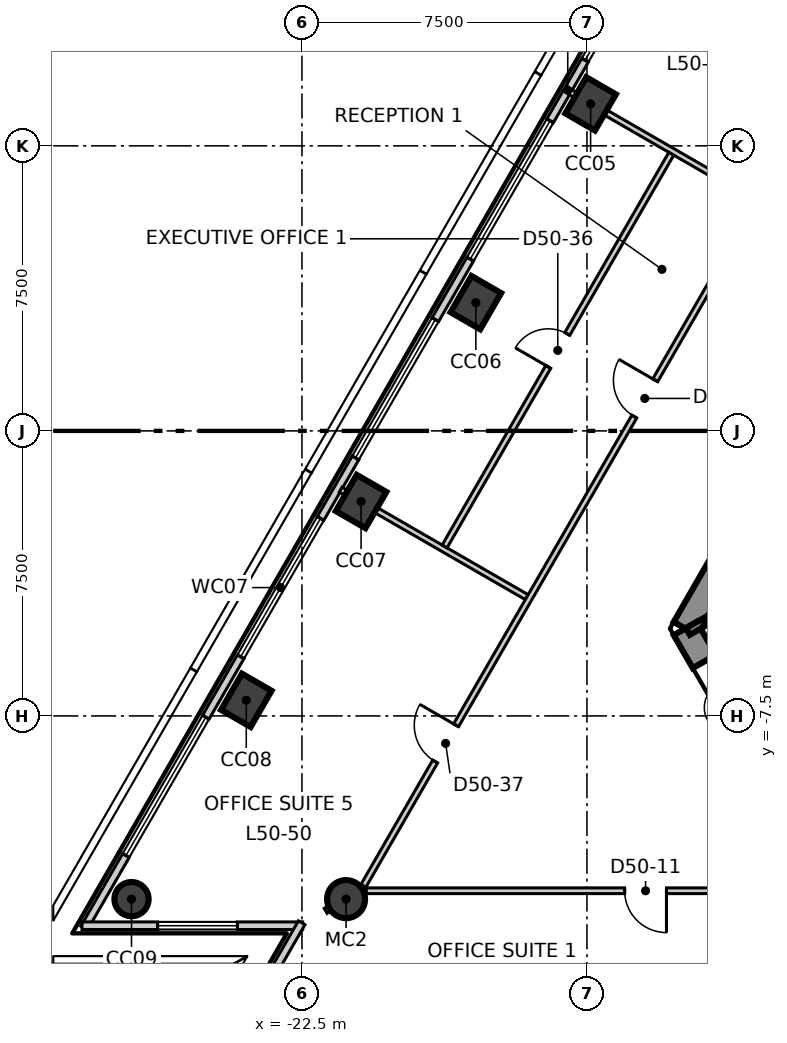
"""IFC4 building model, lengths in metres.
Left out: names, types, materials, properties, quantities, classifications, styles, units other than length and angle.
Written with IfcOpenShell. Run it as: python <this file> out.ifc"""

import sys

from ifc_helpers import new_model, si_unit, direction, frame, frame_2d, origin, origin_2d, place, context, subcontext, project, spatial, polyline, rectangle, circle, outline, extrude, element, fill, save


model = new_model("IFC4")
c1 = context("Model", 3, precision=1e-05, world=origin(), true_north=direction((0.0, 1.0)))
c2 = subcontext(c1, "Body", "Model", "MODEL_VIEW")
j1 = project(units=[si_unit("LENGTHUNIT", "METRE"), si_unit("PLANEANGLEUNIT", "RADIAN")], contexts=[c1])
p1 = place(None, origin())
s1 = spatial("IfcSite", under=j1, at=p1, CompositionType="ELEMENT")
p2 = place(p1, origin())
s2 = spatial("IfcBuilding", under=s1, at=p2, CompositionType="ELEMENT")
p3 = place(p2, frame((0.0, 0.0, 215.3)))
s3 = spatial("IfcBuildingStorey", under=s2, at=p3, CompositionType="ELEMENT", Elevation=215.3)
p4 = place(p3, frame((-1.703, 13.35, -0.3), z_axis=(0.0, 0.0, 1.0), x_axis=(-0.500011533395, -0.866018744874, 0.0)))
e1 = element("IfcWall", 1, at=p4, inside=s3, PredefinedType="SHEAR", context=c2, shape_type="SweptSolid", body=[
    extrude(outline(polyline([(-0.202, -0.35), (1.782, -0.35), (3.766, -0.35), (5.75, -0.35), (7.734, -0.35), (9.718, -0.35), (11.702, -0.35), (13.686, -0.35), (15.67, -0.35), (17.654, -0.35), (19.638, -0.35), (21.622, -0.35), (21.218, 0.35), (19.307, 0.35), (17.397, 0.35), (15.486, 0.35), (13.576, 0.35), (11.665, 0.35), (9.755, 0.35), (7.844, 0.35), (5.934, 0.35), (4.023, 0.35), (2.113, 0.35), (0.202, 0.35), (-0.202, -0.35)])), origin(), (0.0, 0.0, 1.0), 4.0),
])
p5 = place(p4, frame((10.16, 0.0, 0.3)))
e2 = element("IfcOpeningElement", 2, at=p5, cuts=e1, PredefinedType="OPENING", context=c2, shape_type="SweptSolid", body=[
    extrude(rectangle(XDim=1.1, YDim=2.1, at=frame_2d((0.55, 1.05))), frame((0.0, 0.36, 0.0), z_axis=(0.0, -1.0, 0.0), x_axis=(1.0, 0.0, 0.0)), (0.0, 0.0, 1.0), 0.72),
])
p6 = place(p4, frame((16.465, 0.0, 0.3)))
e3 = element("IfcOpeningElement", 3, at=p6, cuts=e1, PredefinedType="OPENING", context=c2, shape_type="SweptSolid", body=[
    extrude(rectangle(XDim=0.9, YDim=2.1, at=frame_2d((0.45, 1.05))), frame((0.0, 0.36, 0.0), z_axis=(0.0, -1.0, 0.0), x_axis=(1.0, 0.0, 0.0)), (0.0, 0.0, 1.0), 0.72),
])
p7 = place(p4, frame((4.005, 0.0, 0.3)))
e4 = element("IfcOpeningElement", 4, at=p7, cuts=e1, PredefinedType="OPENING", context=c2, shape_type="SweptSolid", body=[
    extrude(rectangle(XDim=1.0, YDim=2.1, at=frame_2d((0.5, 1.05))), frame((0.0, 0.36, 0.0), z_axis=(0.0, -1.0, 0.0), x_axis=(1.0, 0.0, 0.0)), (0.0, 0.0, 1.0), 0.72),
])
p8 = place(p3, frame((-12.413, -5.2, -0.3), z_axis=(0.0, 0.0, 1.0), x_axis=(0.49999337185, -0.866029230515, 0.0)))
e5 = element("IfcWall", 5, at=p8, inside=s3, PredefinedType="SHEAR", context=c2, shape_type="SweptSolid", body=[
    extrude(outline(polyline([(-0.202, -0.35), (1.703, -0.35), (3.608, -0.35), (3.204, 0.35), (1.703, 0.35), (0.202, 0.35), (-0.202, -0.35)])), origin(), (0.0, 0.0, 1.0), 4.0),
])
p9 = place(p8, frame((1.003, 0.0, 0.3)))
e6 = element("IfcOpeningElement", 6, at=p9, cuts=e5, PredefinedType="OPENING", context=c2, shape_type="SweptSolid", body=[
    extrude(rectangle(XDim=1.4, YDim=2.1, at=frame_2d((0.7, 1.05))), frame((0.0, 0.36, 0.0), z_axis=(0.0, -1.0, 0.0), x_axis=(1.0, 0.0, 0.0)), (0.0, 0.0, 1.0), 0.72),
])
for number, where, z_axis, x_axis in (
    (7, (-14.904, 8.605, -0.3), (0.0, 0.0, 1.0), (0.5, 0.866, 0.0)),
    (8, (-17.924, 3.374, -0.3), (0.0, 0.0, 1.0), (0.5, 0.866, 0.0)),
    (9, (-20.944, -1.858, -0.3), (0.0, 0.0, 1.0), (0.5, 0.866, 0.0)),
    (10, (-23.965, -7.089, -0.3), (0.0, 0.0, 1.0), (0.5, 0.866, 0.0)),
):
    element("IfcColumn", number, at=place(p3, frame(where, z_axis=z_axis, x_axis=x_axis)), inside=s3, PredefinedType="COLUMN", context=c2, shape_type="SweptSolid", body=[
        extrude(rectangle(XDim=1.1, YDim=0.9, at=origin_2d()), origin(), (0.0, 0.0, 1.0), 4.0),
    ])
p10 = place(p3, frame((-26.985, -12.32, -0.3), z_axis=(0.0, 0.0, 1.0), x_axis=(0.5, 0.866025403784, 0.0)))
e11 = element("IfcColumn", 11, at=p10, inside=s3, PredefinedType="COLUMN", context=c2, shape_type="SweptSolid", body=[
    extrude(circle(Radius=0.45, at=origin_2d()), origin(), (0.0, 0.0, 1.0), 4.0),
])
p11 = place(p3, frame((-21.339, -12.32, -0.3), z_axis=(0.0, 0.0, 1.0), x_axis=(1.0, 0.0, 0.0)))
e12 = element("IfcColumn", 12, at=p11, inside=s3, PredefinedType="COLUMN", context=c2, shape_type="SweptSolid", body=[
    extrude(circle(Radius=0.5, at=origin_2d()), origin(), (0.0, 0.0, 1.0), 4.0),
])
p12 = place(p3, frame((-2.778, 31.008, 0.0), z_axis=(0.0, 0.0, 1.0), x_axis=(-0.499999612413, -0.866025627558, 0.0)))
e13 = element("IfcWall", 13, at=p12, inside=s3, PredefinedType="ELEMENTEDWALL", context=c2, shape_type="SweptSolid", body=[
    extrude(rectangle(XDim=50.91, YDim=0.2, at=frame_2d((25.455, 0.0))), origin(), (0.0, 0.0, 1.0), 3.7),
])
p13 = place(p12, frame((2.223, 0.0, 0.9)))
e14 = element("IfcOpeningElement", 14, at=p13, cuts=e13, PredefinedType="OPENING", context=c2, shape_type="SweptSolid", body=[
    extrude(rectangle(XDim=4.2, YDim=2.5, at=frame_2d((2.1, 1.25))), frame((0.0, 0.11, 0.0), z_axis=(0.0, -1.0, 0.0), x_axis=(1.0, 0.0, 0.0)), (0.0, 0.0, 1.0), 0.22),
])
p14 = place(p12, frame((8.263, 0.0, 0.9)))
e15 = element("IfcOpeningElement", 15, at=p14, cuts=e13, PredefinedType="OPENING", context=c2, shape_type="SweptSolid", body=[
    extrude(rectangle(XDim=4.2, YDim=2.5, at=frame_2d((2.1, 1.25))), frame((0.0, 0.11, 0.0), z_axis=(0.0, -1.0, 0.0), x_axis=(1.0, 0.0, 0.0)), (0.0, 0.0, 1.0), 0.22),
])
p15 = place(p12, frame((14.304, 0.0, 0.9)))
e16 = element("IfcOpeningElement", 16, at=p15, cuts=e13, PredefinedType="OPENING", context=c2, shape_type="SweptSolid", body=[
    extrude(rectangle(XDim=4.2, YDim=2.5, at=frame_2d((2.1, 1.25))), frame((0.0, 0.11, 0.0), z_axis=(0.0, -1.0, 0.0), x_axis=(1.0, 0.0, 0.0)), (0.0, 0.0, 1.0), 0.22),
])
p16 = place(p12, frame((20.344, 0.0, 0.9)))
e17 = element("IfcOpeningElement", 17, at=p16, cuts=e13, PredefinedType="OPENING", context=c2, shape_type="SweptSolid", body=[
    extrude(rectangle(XDim=4.2, YDim=2.5, at=frame_2d((2.1, 1.25))), frame((0.0, 0.11, 0.0), z_axis=(0.0, -1.0, 0.0), x_axis=(1.0, 0.0, 0.0)), (0.0, 0.0, 1.0), 0.22),
])
p17 = place(p12, frame((26.385, 0.0, 0.9)))
e18 = element("IfcOpeningElement", 18, at=p17, cuts=e13, PredefinedType="OPENING", context=c2, shape_type="SweptSolid", body=[
    extrude(rectangle(XDim=4.2, YDim=2.5, at=frame_2d((2.1, 1.25))), frame((0.0, 0.11, 0.0), z_axis=(0.0, -1.0, 0.0), x_axis=(1.0, 0.0, 0.0)), (0.0, 0.0, 1.0), 0.22),
])
p18 = place(p12, frame((32.425, 0.0, 0.9)))
e19 = element("IfcOpeningElement", 19, at=p18, cuts=e13, PredefinedType="OPENING", context=c2, shape_type="SweptSolid", body=[
    extrude(rectangle(XDim=4.2, YDim=2.5, at=frame_2d((2.1, 1.25))), frame((0.0, 0.11, 0.0), z_axis=(0.0, -1.0, 0.0), x_axis=(1.0, 0.0, 0.0)), (0.0, 0.0, 1.0), 0.22),
])
p19 = place(p12, frame((38.466, 0.0, 0.9)))
e20 = element("IfcOpeningElement", 20, at=p19, cuts=e13, PredefinedType="OPENING", context=c2, shape_type="SweptSolid", body=[
    extrude(rectangle(XDim=4.2, YDim=2.5, at=frame_2d((2.1, 1.25))), frame((0.0, 0.11, 0.0), z_axis=(0.0, -1.0, 0.0), x_axis=(1.0, 0.0, 0.0)), (0.0, 0.0, 1.0), 0.22),
])
p20 = place(p12, frame((44.506, 0.0, 0.9)))
e21 = element("IfcOpeningElement", 21, at=p20, cuts=e13, PredefinedType="OPENING", context=c2, shape_type="SweptSolid", body=[
    extrude(rectangle(XDim=4.2, YDim=2.5, at=frame_2d((2.1, 1.25))), frame((0.0, 0.11, 0.0), z_axis=(0.0, -1.0, 0.0), x_axis=(1.0, 0.0, 0.0)), (0.0, 0.0, 1.0), 0.22),
])
p21 = place(p3, frame((-28.288, -13.02, 0.0), z_axis=(0.0, 0.0, 1.0), x_axis=(1.0, 0.0, 0.0)))
e22 = element("IfcWall", 22, at=p21, inside=s3, PredefinedType="ELEMENTEDWALL", context=c2, shape_type="SweptSolid", body=[
    extrude(rectangle(XDim=5.806, YDim=0.2, at=frame_2d((2.903, 0.0))), origin(), (0.0, 0.0, 1.0), 3.7),
])
p22 = place(p21, frame((1.99, 0.0, 0.9)))
e23 = element("IfcOpeningElement", 23, at=p22, cuts=e22, PredefinedType="OPENING", context=c2, shape_type="SweptSolid", body=[
    extrude(rectangle(XDim=2.1, YDim=2.5, at=frame_2d((1.05, 1.25))), frame((0.0, 0.11, 0.0), z_axis=(0.0, -1.0, 0.0), x_axis=(1.0, 0.0, 0.0)), (0.0, 0.0, 1.0), 0.22),
])
p23 = place(p3, frame((-22.507, -12.942, 0.0), z_axis=(0.0, 0.0, 1.0), x_axis=(-0.499910499212, -0.866077070922, 0.0)))
e24 = element("IfcWall", 24, at=p23, inside=s3, PredefinedType="ELEMENTEDWALL", context=c2, shape_type="SweptSolid", body=[
    extrude(rectangle(XDim=5.807, YDim=0.2, at=frame_2d((2.903, 0.0))), origin(), (0.0, 0.0, 1.0), 3.7),
])
p24 = place(p23, frame((1.39, 0.0, 0.9)))
e25 = element("IfcOpeningElement", 25, at=p24, cuts=e24, PredefinedType="OPENING", context=c2, shape_type="SweptSolid", body=[
    extrude(rectangle(XDim=2.1, YDim=2.5, at=frame_2d((1.05, 1.25))), frame((0.0, 0.11, 0.0), z_axis=(0.0, -1.0, 0.0), x_axis=(1.0, 0.0, 0.0)), (0.0, 0.0, 1.0), 0.22),
])
p25 = place(p3, frame((-21.876, -12.63, 0.0), z_axis=(0.0, 0.0, 1.0), x_axis=(0.865940358422, 0.500147273966, 0.0)))
e26 = element("IfcWall", 26, at=p25, inside=s3, PredefinedType="PARTITIONING", context=c2, shape_type="SweptSolid", body=[
    extrude(rectangle(XDim=1.061, YDim=0.15, at=frame_2d((0.531, 0.0))), origin(), (0.0, 0.0, 1.0), 3.7),
])
p26 = place(p3, frame((-21.481, -1.548, 0.0), z_axis=(0.0, 0.0, 1.0), x_axis=(0.866053291823, -0.49995169339, 0.0)))
e27 = element("IfcWall", 27, at=p26, inside=s3, PredefinedType="PARTITIONING", context=c2, shape_type="SweptSolid", body=[
    extrude(rectangle(XDim=5.654, YDim=0.15, at=frame_2d((2.827, 0.0))), origin(), (0.0, 0.0, 1.0), 3.7),
])
p27 = place(p3, frame((-20.883, -11.97, 0.0), z_axis=(0.0, 0.0, 1.0), x_axis=(0.500006150555, 0.866021852731, 0.0)))
e28 = element("IfcWall", 28, at=p27, inside=s3, PredefinedType="PARTITIONING", context=c2, shape_type="SweptSolid", body=[
    extrude(rectangle(XDim=41.766, YDim=0.15, at=frame_2d((20.883, 0.0))), origin(), (0.0, 0.0, 1.0), 3.7),
])
p28 = place(p27, frame((36.816, 0.0, 0.0)))
e29 = element("IfcOpeningElement", 29, at=p28, cuts=e28, PredefinedType="OPENING", context=c2, shape_type="SweptSolid", body=[
    extrude(rectangle(XDim=1.1, YDim=2.1, at=frame_2d((0.55, 1.05))), frame((0.0, 0.085, 0.0), z_axis=(0.0, -1.0, 0.0), x_axis=(1.0, 0.0, 0.0)), (0.0, 0.0, 1.0), 0.17),
])
p29 = place(p27, frame((23.939, 0.0, 0.0)))
e30 = element("IfcOpeningElement", 30, at=p29, cuts=e28, PredefinedType="OPENING", context=c2, shape_type="SweptSolid", body=[
    extrude(rectangle(XDim=1.1, YDim=2.1, at=frame_2d((0.55, 1.05))), frame((0.0, 0.085, 0.0), z_axis=(0.0, -1.0, 0.0), x_axis=(1.0, 0.0, 0.0)), (0.0, 0.0, 1.0), 0.17),
])
p30 = place(p27, frame((31.139, 0.0, 0.0)))
e31 = element("IfcOpeningElement", 31, at=p30, cuts=e28, PredefinedType="OPENING", context=c2, shape_type="SweptSolid", body=[
    extrude(rectangle(XDim=0.9, YDim=2.1, at=frame_2d((0.45, 1.05))), frame((0.0, 0.085, 0.0), z_axis=(0.0, -1.0, 0.0), x_axis=(1.0, 0.0, 0.0)), (0.0, 0.0, 1.0), 0.17),
])
p31 = place(p27, frame((28.739, 0.0, 0.0)))
e32 = element("IfcOpeningElement", 32, at=p31, cuts=e28, PredefinedType="OPENING", context=c2, shape_type="SweptSolid", body=[
    extrude(rectangle(XDim=0.9, YDim=2.1, at=frame_2d((0.45, 1.05))), frame((0.0, 0.085, 0.0), z_axis=(0.0, -1.0, 0.0), x_axis=(1.0, 0.0, 0.0)), (0.0, 0.0, 1.0), 0.17),
])
p32 = place(p27, frame((14.258, 0.0, 0.0)))
e33 = element("IfcOpeningElement", 33, at=p32, cuts=e28, PredefinedType="OPENING", context=c2, shape_type="SweptSolid", body=[
    extrude(rectangle(XDim=1.1, YDim=2.1, at=frame_2d((0.55, 1.05))), frame((0.0, 0.085, 0.0), z_axis=(0.0, -1.0, 0.0), x_axis=(1.0, 0.0, 0.0)), (0.0, 0.0, 1.0), 0.17),
])
p33 = place(p27, frame((3.777, 0.0, 0.0)))
e34 = element("IfcOpeningElement", 34, at=p33, cuts=e28, PredefinedType="OPENING", context=c2, shape_type="SweptSolid", body=[
    extrude(rectangle(XDim=1.1, YDim=2.1, at=frame_2d((0.55, 1.05))), frame((0.0, 0.085, 0.0), z_axis=(0.0, -1.0, 0.0), x_axis=(1.0, 0.0, 0.0)), (0.0, 0.0, 1.0), 0.17),
])
p34 = place(p3, frame((-20.808, -12.1, 0.0), z_axis=(0.0, 0.0, 1.0), x_axis=(1.0, 0.0, 0.0)))
e35 = element("IfcWall", 35, at=p34, inside=s3, PredefinedType="PARTITIONING", context=c2, shape_type="SweptSolid", body=[
    extrude(rectangle(XDim=41.766, YDim=0.15, at=frame_2d((20.883, 0.0))), origin(), (0.0, 0.0, 1.0), 3.7),
])
p35 = place(p34, frame((6.8, 0.0, 0.0)))
e36 = element("IfcOpeningElement", 36, at=p35, cuts=e35, PredefinedType="OPENING", context=c2, shape_type="SweptSolid", body=[
    extrude(rectangle(XDim=1.1, YDim=2.1, at=frame_2d((0.55, 1.05))), frame((0.0, 0.085, 0.0), z_axis=(0.0, -1.0, 0.0), x_axis=(1.0, 0.0, 0.0)), (0.0, 0.0, 1.0), 0.17),
])
p36 = place(p34, frame((17.317, 0.0, 0.0)))
e37 = element("IfcOpeningElement", 37, at=p36, cuts=e35, PredefinedType="OPENING", context=c2, shape_type="SweptSolid", body=[
    extrude(rectangle(XDim=1.0, YDim=2.1, at=frame_2d((0.5, 1.05))), frame((0.0, 0.085, 0.0), z_axis=(0.0, -1.0, 0.0), x_axis=(1.0, 0.0, 0.0)), (0.0, 0.0, 1.0), 0.17),
])
p37 = place(p34, frame((30.658, 0.0, 0.0)))
e38 = element("IfcOpeningElement", 38, at=p37, cuts=e35, PredefinedType="OPENING", context=c2, shape_type="SweptSolid", body=[
    extrude(rectangle(XDim=1.1, YDim=2.1, at=frame_2d((0.55, 1.05))), frame((0.0, 0.085, 0.0), z_axis=(0.0, -1.0, 0.0), x_axis=(1.0, 0.0, 0.0)), (0.0, 0.0, 1.0), 0.17),
])
p38 = place(p34, frame((21.958, 0.0, 0.0)))
e39 = element("IfcOpeningElement", 39, at=p38, cuts=e35, PredefinedType="OPENING", context=c2, shape_type="SweptSolid", body=[
    extrude(rectangle(XDim=0.9, YDim=2.1, at=frame_2d((0.45, 1.05))), frame((0.0, 0.085, 0.0), z_axis=(0.0, -1.0, 0.0), x_axis=(1.0, 0.0, 0.0)), (0.0, 0.0, 1.0), 0.17),
])
p39 = place(p34, frame((25.158, 0.0, 0.0)))
e40 = element("IfcOpeningElement", 40, at=p39, cuts=e35, PredefinedType="OPENING", context=c2, shape_type="SweptSolid", body=[
    extrude(rectangle(XDim=0.9, YDim=2.1, at=frame_2d((0.45, 1.05))), frame((0.0, 0.085, 0.0), z_axis=(0.0, -1.0, 0.0), x_axis=(1.0, 0.0, 0.0)), (0.0, 0.0, 1.0), 0.17),
])
p40 = place(p34, frame((27.958, 0.0, 0.0)))
e41 = element("IfcOpeningElement", 41, at=p40, cuts=e35, PredefinedType="OPENING", context=c2, shape_type="SweptSolid", body=[
    extrude(rectangle(XDim=1.0, YDim=2.1, at=frame_2d((0.5, 1.05))), frame((0.0, 0.085, 0.0), z_axis=(0.0, -1.0, 0.0), x_axis=(1.0, 0.0, 0.0)), (0.0, 0.0, 1.0), 0.17),
])
p41 = place(p34, frame((36.839, 0.0, 0.0)))
e42 = element("IfcOpeningElement", 42, at=p41, cuts=e35, PredefinedType="OPENING", context=c2, shape_type="SweptSolid", body=[
    extrude(rectangle(XDim=1.0, YDim=2.1, at=frame_2d((0.5, 1.05))), frame((0.0, 0.085, 0.0), z_axis=(0.0, -1.0, 0.0), x_axis=(1.0, 0.0, 0.0)), (0.0, 0.0, 1.0), 0.17),
])
p42 = place(p3, frame((-15.441, 8.915, 0.0), z_axis=(0.0, 0.0, 1.0), x_axis=(0.866034596441, -0.499984077514, 0.0)))
e43 = element("IfcWall", 43, at=p42, inside=s3, PredefinedType="PARTITIONING", context=c2, shape_type="SweptSolid", body=[
    extrude(rectangle(XDim=5.655, YDim=0.15, at=frame_2d((2.827, 0.0))), origin(), (0.0, 0.0, 1.0), 3.2),
])
p43 = place(p3, frame((-18.746, -3.04, 0.0), z_axis=(0.0, 0.0, 1.0), x_axis=(0.499992887898, 0.866029509919, 0.0)))
e44 = element("IfcWall", 44, at=p43, inside=s3, PredefinedType="PARTITIONING", context=c2, shape_type="SweptSolid", body=[
    extrude(rectangle(XDim=11.93, YDim=0.15, at=frame_2d((5.965, 0.0))), origin(), (0.0, 0.0, 1.0), 3.7),
])
p44 = place(p43, frame((5.456, 0.0, 0.0)))
e45 = element("IfcOpeningElement", 45, at=p44, cuts=e44, PredefinedType="OPENING", context=c2, shape_type="SweptSolid", body=[
    extrude(rectangle(XDim=1.0, YDim=2.1, at=frame_2d((0.5, 1.05))), frame((0.0, 0.085, 0.0), z_axis=(0.0, -1.0, 0.0), x_axis=(1.0, 0.0, 0.0)), (0.0, 0.0, 1.0), 0.17),
])
p45 = place(p3, frame((-12.344, -5.279, 0.0), z_axis=(0.0, 0.0, 1.0), x_axis=(0.866046323291, 0.499963764601, 0.0)))
e46 = element("IfcWall", 46, at=p45, inside=s3, PredefinedType="SOLIDWALL", context=c2, shape_type="SweptSolid", body=[
    extrude(rectangle(XDim=6.714, YDim=0.2, at=frame_2d((3.357, 0.0))), origin(), (0.0, 0.0, 1.0), 3.7),
])
p46 = place(p16, origin())
e47 = element("IfcWindow", 47, at=p46, inside=s3, PartitioningType="SINGLE_PANEL", PredefinedType="WINDOW", context=c2, shape_type="SweptSolid", body=[
    extrude(rectangle(XDim=4.2, YDim=2.5, at=frame_2d((2.1, 1.25))), frame((0.0, 0.03, 0.0), z_axis=(0.0, -1.0, 0.0), x_axis=(1.0, 0.0, 0.0)), (0.0, 0.0, 1.0), 0.06),
])
fill(e17, e47)
p47 = place(p17, origin())
e48 = element("IfcWindow", 48, at=p47, inside=s3, PartitioningType="SINGLE_PANEL", PredefinedType="WINDOW", context=c2, shape_type="SweptSolid", body=[
    extrude(rectangle(XDim=4.2, YDim=2.5, at=frame_2d((2.1, 1.25))), frame((0.0, 0.03, 0.0), z_axis=(0.0, -1.0, 0.0), x_axis=(1.0, 0.0, 0.0)), (0.0, 0.0, 1.0), 0.06),
])
fill(e18, e48)
p48 = place(p18, origin())
e49 = element("IfcWindow", 49, at=p48, inside=s3, PartitioningType="SINGLE_PANEL", PredefinedType="WINDOW", context=c2, shape_type="SweptSolid", body=[
    extrude(rectangle(XDim=4.2, YDim=2.5, at=frame_2d((2.1, 1.25))), frame((0.0, 0.03, 0.0), z_axis=(0.0, -1.0, 0.0), x_axis=(1.0, 0.0, 0.0)), (0.0, 0.0, 1.0), 0.06),
])
fill(e19, e49)
p49 = place(p19, origin())
e50 = element("IfcWindow", 50, at=p49, inside=s3, PartitioningType="SINGLE_PANEL", PredefinedType="WINDOW", context=c2, shape_type="SweptSolid", body=[
    extrude(rectangle(XDim=4.2, YDim=2.5, at=frame_2d((2.1, 1.25))), frame((0.0, 0.03, 0.0), z_axis=(0.0, -1.0, 0.0), x_axis=(1.0, 0.0, 0.0)), (0.0, 0.0, 1.0), 0.06),
])
fill(e20, e50)
p50 = place(p20, origin())
e51 = element("IfcWindow", 51, at=p50, inside=s3, PartitioningType="SINGLE_PANEL", PredefinedType="WINDOW", context=c2, shape_type="SweptSolid", body=[
    extrude(rectangle(XDim=4.2, YDim=2.5, at=frame_2d((2.1, 1.25))), frame((0.0, 0.03, 0.0), z_axis=(0.0, -1.0, 0.0), x_axis=(1.0, 0.0, 0.0)), (0.0, 0.0, 1.0), 0.06),
])
fill(e21, e51)
p51 = place(p22, origin())
e52 = element("IfcWindow", 52, at=p51, inside=s3, PartitioningType="SINGLE_PANEL", PredefinedType="WINDOW", context=c2, shape_type="SweptSolid", body=[
    extrude(rectangle(XDim=2.1, YDim=2.5, at=frame_2d((1.05, 1.25))), frame((0.0, 0.03, 0.0), z_axis=(0.0, -1.0, 0.0), x_axis=(1.0, 0.0, 0.0)), (0.0, 0.0, 1.0), 0.06),
])
fill(e23, e52)
p52 = place(p35, origin())
e53 = element("IfcDoor", 53, at=p52, inside=s3, OperationType="SINGLE_SWING_RIGHT", PredefinedType="DOOR", context=c2, shape_type="SweptSolid", body=[
    extrude(rectangle(XDim=1.1, YDim=2.1, at=frame_2d((0.55, 1.05))), frame((0.0, 0.025, 0.0), z_axis=(0.0, -1.0, 0.0), x_axis=(1.0, 0.0, 0.0)), (0.0, 0.0, 1.0), 0.05),
])
fill(e36, e53)
p53 = place(p32, origin())
e54 = element("IfcDoor", 54, at=p53, inside=s3, OperationType="SINGLE_SWING_LEFT", PredefinedType="DOOR", context=c2, shape_type="SweptSolid", body=[
    extrude(rectangle(XDim=1.1, YDim=2.1, at=frame_2d((0.55, 1.05))), frame((0.0, 0.025, 0.0), z_axis=(0.0, -1.0, 0.0), x_axis=(1.0, 0.0, 0.0)), (0.0, 0.0, 1.0), 0.05),
])
fill(e33, e54)
p54 = place(p44, origin())
e55 = element("IfcDoor", 55, at=p54, inside=s3, OperationType="SINGLE_SWING_RIGHT", PredefinedType="DOOR", context=c2, shape_type="SweptSolid", body=[
    extrude(rectangle(XDim=1.0, YDim=2.1, at=frame_2d((0.5, 1.05))), frame((0.0, 0.025, 0.0), z_axis=(0.0, -1.0, 0.0), x_axis=(1.0, 0.0, 0.0)), (0.0, 0.0, 1.0), 0.05),
])
fill(e45, e55)
p55 = place(p33, origin())
e56 = element("IfcDoor", 56, at=p55, inside=s3, OperationType="SINGLE_SWING_LEFT", PredefinedType="DOOR", context=c2, shape_type="SweptSolid", body=[
    extrude(rectangle(XDim=1.1, YDim=2.1, at=frame_2d((0.55, 1.05))), frame((0.0, 0.025, 0.0), z_axis=(0.0, -1.0, 0.0), x_axis=(1.0, 0.0, 0.0)), (0.0, 0.0, 1.0), 0.05),
])
fill(e34, e56)
p56 = place(p9, origin())
e57 = element("IfcDoor", 57, at=p56, inside=s3, OperationType="DOUBLE_DOOR_SINGLE_SWING", PredefinedType="DOOR", context=c2, shape_type="SweptSolid", body=[
    extrude(rectangle(XDim=1.4, YDim=2.1, at=frame_2d((0.7, 1.05))), frame((0.0, 0.025, 0.0), z_axis=(0.0, -1.0, 0.0), x_axis=(1.0, 0.0, 0.0)), (0.0, 0.0, 1.0), 0.05),
])
fill(e6, e57)
save(model, sys.argv[1])
